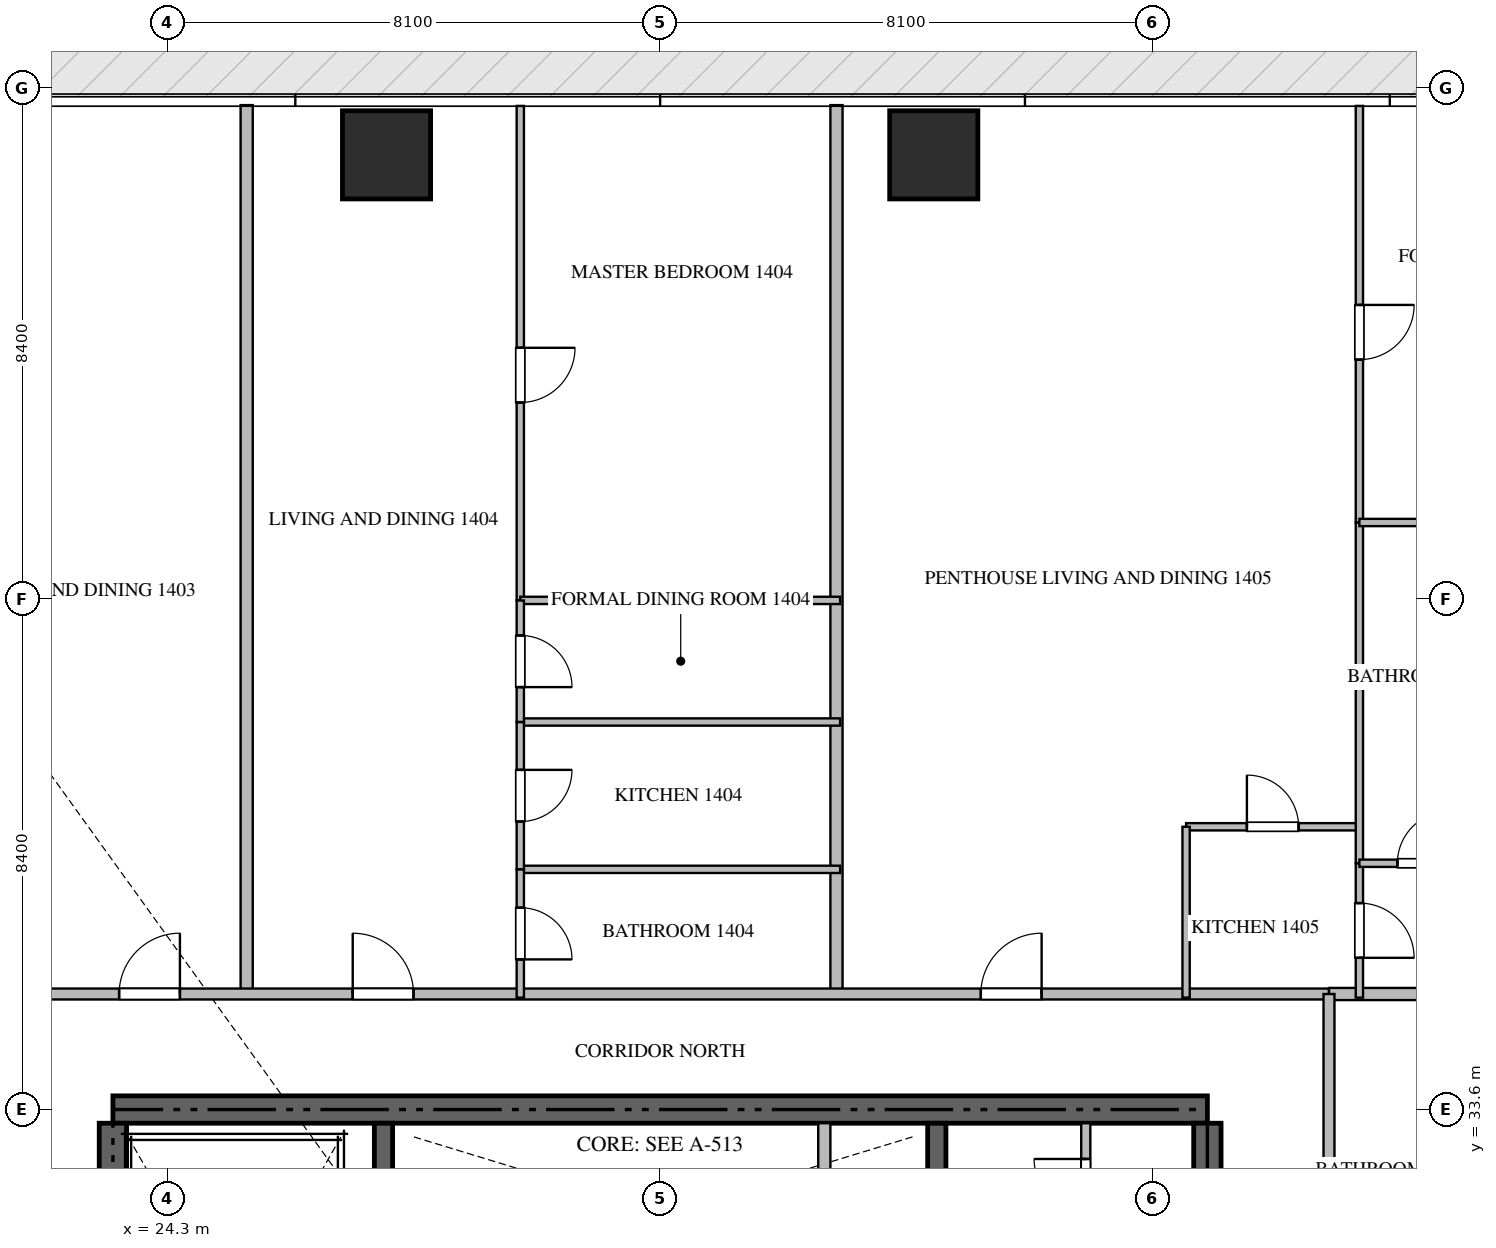
"""IFC4 building model, lengths in metres.
Left out: names, types, materials, properties, quantities, classifications, styles, units other than length and angle.
Written with IfcOpenShell. Run it as: python <this file> out.ifc"""

import sys

from ifc_helpers import new_model, si_unit, direction, frame, frame_2d, origin, origin_2d, place, context, subcontext, project, spatial, rectangle, extrude, source, transform, mapped, element, fill, save


model = new_model("IFC4")
c1 = context("Model", 3, precision=1e-05, world=origin(), true_north=direction((0.0, 1.0)))
c2 = subcontext(c1, "Body", "Model", "MODEL_VIEW")
j1 = project(units=[si_unit("LENGTHUNIT", "METRE"), si_unit("PLANEANGLEUNIT", "RADIAN")], contexts=[c1])
p1 = place(None, origin())
s1 = spatial("IfcSite", under=j1, at=p1, CompositionType="ELEMENT")
p2 = place(p1, origin())
s2 = spatial("IfcBuilding", under=s1, at=p2, CompositionType="ELEMENT")
p3 = place(p2, frame((0.0, 0.0, 60.45)))
s3 = spatial("IfcBuildingStorey", under=s2, at=p3, CompositionType="ELEMENT", Elevation=60.45)
p4 = place(p3, frame((41.4, 33.6, -0.26), z_axis=(0.0, 0.0, 1.0), x_axis=(-1.0, 0.0, 0.0)))
e1 = element("IfcWall", 1, at=p4, inside=s3, PredefinedType="SHEAR", context=c2, shape_type="SweptSolid", body=[
    extrude(rectangle(XDim=18.0, YDim=0.45, at=frame_2d((9.0, 0.0))), origin(), (0.0, 0.0, 1.0), 3.748),
])
p5 = place(p3, frame((23.4, 24.25, -0.26), z_axis=(0.0, 0.0, 1.0), x_axis=(0.0, 1.0, 0.0)))
e2 = element("IfcWall", 2, at=p5, inside=s3, PredefinedType="SHEAR", context=c2, shape_type="SweptSolid", body=[
    extrude(rectangle(XDim=9.125, YDim=0.45, at=frame_2d((4.562, 0.0))), origin(), (0.0, 0.0, 1.0), 3.748),
])
p6 = place(p3, frame((41.4, 27.75, -0.26), z_axis=(0.0, 0.0, 1.0), x_axis=(0.0, 1.0, 0.0)))
e3 = element("IfcWall", 3, at=p6, inside=s3, PredefinedType="SHEAR", context=c2, shape_type="SweptSolid", body=[
    extrude(rectangle(XDim=5.625, YDim=0.45, at=frame_2d((2.812, 0.0))), origin(), (0.0, 0.0, 1.0), 3.748),
])
p7 = place(p3, frame((27.85, 23.55, -0.26), z_axis=(0.0, 0.0, 1.0), x_axis=(0.0, 1.0, 0.0)))
e4 = element("IfcWall", 4, at=p7, inside=s3, PredefinedType="SHEAR", context=c2, shape_type="SweptSolid", body=[
    extrude(rectangle(XDim=9.825, YDim=0.3, at=frame_2d((4.913, 0.0))), origin(), (0.0, 0.0, 1.0), 3.748),
])
p8 = place(p3, frame((36.95, 27.05, -0.26), z_axis=(0.0, 0.0, 1.0), x_axis=(0.0, 1.0, 0.0)))
e5 = element("IfcWall", 5, at=p8, inside=s3, PredefinedType="SHEAR", context=c2, shape_type="SweptSolid", body=[
    extrude(rectangle(XDim=6.325, YDim=0.3, at=frame_2d((3.163, 0.0))), origin(), (0.0, 0.0, 1.0), 3.748),
])
m1 = source(origin(), c2, "Body", "SweptSolid", [
    extrude(rectangle(XDim=1.45, YDim=1.45, at=origin_2d()), origin(), (0.0, 0.0, 1.0), 3.75),
])
for number, where, z_axis, x_axis in (
    (6, (27.9, 49.3, -0.26), (0.0, 0.0, 1.0), (1.0, 0.0, 0.0)),
    (7, (36.9, 49.3, -0.26), (0.0, 0.0, 1.0), (1.0, 0.0, 0.0)),
):
    element("IfcColumn", number, at=place(p3, frame(where, z_axis=z_axis, x_axis=x_axis)), inside=s3, PredefinedType="COLUMN", context=c2, shape_type="MappedRepresentation", body=[
        mapped(m1, transform((0.0, 0.0, 0.0), scale=1.0)),
    ])
p9 = place(p3, frame((35.1, 30.75, 0.0), z_axis=(0.0, 0.0, 1.0), x_axis=(0.0, 1.0, 0.0)))
e8 = element("IfcWall", 8, at=p9, inside=s3, PredefinedType="STANDARD", context=c2, shape_type="SweptSolid", body=[
    extrude(rectangle(XDim=2.625, YDim=0.2, at=frame_2d((1.312, 0.0))), origin(), (0.0, 0.0, 1.0), 3.49),
])
p10 = place(p3, frame((39.4, 31.35, 0.0), z_axis=(0.0, 0.0, 1.0), x_axis=(0.0, 1.0, 0.0)))
e9 = element("IfcWall", 9, at=p10, inside=s3, PredefinedType="PARTITIONING", context=c2, shape_type="SweptSolid", body=[
    extrude(rectangle(XDim=2.025, YDim=0.15, at=frame_2d((1.012, 0.0))), origin(), (0.0, 0.0, 1.0), 3.49),
])
p11 = place(p10, frame((0.587, 0.0, 0.0)))
e10 = element("IfcOpeningElement", 10, at=p11, cuts=e9, PredefinedType="OPENING", context=c2, shape_type="SweptSolid", body=[
    extrude(rectangle(XDim=0.85, YDim=2.1, at=frame_2d((0.425, 1.05))), frame((0.0, 0.085, 0.0), z_axis=(0.0, -1.0, 0.0), x_axis=(1.0, 0.0, 0.0)), (0.0, 0.0, 1.0), 0.17),
])
for number, where, z_axis, x_axis in (
    (11, (25.6, 35.5, 0.0), (0.0, 0.0, 1.0), (0.0, 1.0, 0.0)),
    (12, (35.3, 35.5, 0.0), (0.0, 0.0, 1.0), (0.0, 1.0, 0.0)),
):
    element("IfcWall", number, at=place(p3, frame(where, z_axis=z_axis, x_axis=x_axis)), inside=s3, PredefinedType="PARTITIONING", context=c2, shape_type="SweptSolid", body=[
        extrude(rectangle(XDim=14.618, YDim=0.2, at=frame_2d((7.309, 0.0))), origin(), (0.0, 0.0, 1.0), 3.49),
    ])
p12 = place(p3, frame((43.4, 35.5, 0.0), z_axis=(0.0, 0.0, 1.0), x_axis=(1.0, 0.0, 0.0)))
e13 = element("IfcWall", 13, at=p12, inside=s3, PredefinedType="PARTITIONING", context=c2, shape_type="SweptSolid", body=[
    extrude(rectangle(XDim=15.318, YDim=0.2, at=frame_2d((7.659, 0.0))), origin(), (0.0, 0.0, 1.0), 3.49),
])
p13 = place(p3, frame((21.402, 35.5, 0.0), z_axis=(0.0, 0.0, 1.0), x_axis=(1.0, 0.0, 0.0)))
e14 = element("IfcWall", 14, at=p13, inside=s3, PredefinedType="PARTITIONING", context=c2, shape_type="SweptSolid", body=[
    extrude(rectangle(XDim=21.996, YDim=0.18, at=frame_2d((10.998, 0.0))), origin(), (0.0, 0.0, 1.0), 3.49),
])
p14 = place(p13, frame((2.1, 0.0, 0.0)))
e15 = element("IfcOpeningElement", 15, at=p14, cuts=e14, PredefinedType="OPENING", context=c2, shape_type="SweptSolid", body=[
    extrude(rectangle(XDim=1.0, YDim=2.15, at=frame_2d((0.5, 1.075))), frame((0.0, 0.1, 0.0), z_axis=(0.0, -1.0, 0.0), x_axis=(1.0, 0.0, 0.0)), (0.0, 0.0, 1.0), 0.2),
])
p15 = place(p13, frame((5.942, 0.0, 0.0)))
e16 = element("IfcOpeningElement", 16, at=p15, cuts=e14, PredefinedType="OPENING", context=c2, shape_type="SweptSolid", body=[
    extrude(rectangle(XDim=1.0, YDim=2.15, at=frame_2d((0.5, 1.075))), frame((0.0, 0.1, 0.0), z_axis=(0.0, -1.0, 0.0), x_axis=(1.0, 0.0, 0.0)), (0.0, 0.0, 1.0), 0.2),
])
p16 = place(p13, frame((16.272, 0.0, 0.0)))
e17 = element("IfcOpeningElement", 17, at=p16, cuts=e14, PredefinedType="OPENING", context=c2, shape_type="SweptSolid", body=[
    extrude(rectangle(XDim=1.0, YDim=2.15, at=frame_2d((0.5, 1.075))), frame((0.0, 0.1, 0.0), z_axis=(0.0, -1.0, 0.0), x_axis=(1.0, 0.0, 0.0)), (0.0, 0.0, 1.0), 0.2),
])
p17 = place(p3, frame((43.4, 14.9, 0.0), z_axis=(0.0, 0.0, 1.0), x_axis=(0.0, 1.0, 0.0)))
e18 = element("IfcWall", 18, at=p17, inside=s3, PredefinedType="PARTITIONING", context=c2, shape_type="SweptSolid", body=[
    extrude(rectangle(XDim=20.6, YDim=0.18, at=frame_2d((10.3, 0.0))), origin(), (0.0, 0.0, 1.0), 3.49),
])
p18 = place(p17, frame((5.429, 0.0, 0.0)))
e19 = element("IfcOpeningElement", 19, at=p18, cuts=e18, PredefinedType="OPENING", context=c2, shape_type="SweptSolid", body=[
    extrude(rectangle(XDim=1.0, YDim=2.15, at=frame_2d((0.5, 1.075))), frame((0.0, 0.1, 0.0), z_axis=(0.0, -1.0, 0.0), x_axis=(1.0, 0.0, 0.0)), (0.0, 0.0, 1.0), 0.2),
])
p19 = place(p17, frame((10.506, 0.0, 0.0)))
e20 = element("IfcOpeningElement", 20, at=p19, cuts=e18, PredefinedType="OPENING", context=c2, shape_type="SweptSolid", body=[
    extrude(rectangle(XDim=1.0, YDim=2.15, at=frame_2d((0.5, 1.075))), frame((0.0, 0.1, 0.0), z_axis=(0.0, -1.0, 0.0), x_axis=(1.0, 0.0, 0.0)), (0.0, 0.0, 1.0), 0.2),
])
p20 = place(p3, frame((30.1, 50.105, 0.0), z_axis=(0.0, 0.0, 1.0), x_axis=(0.0, -1.0, 0.0)))
e21 = element("IfcWall", 21, at=p20, inside=s3, PredefinedType="PARTITIONING", context=c2, shape_type="SweptSolid", body=[
    extrude(rectangle(XDim=8.132, YDim=0.12, at=frame_2d((4.066, 0.0))), origin(), (0.0, 0.0, 1.0), 3.49),
])
p21 = place(p20, frame((3.978, 0.0, 0.0)))
e22 = element("IfcOpeningElement", 22, at=p21, cuts=e21, PredefinedType="OPENING", context=c2, shape_type="SweptSolid", body=[
    extrude(rectangle(XDim=0.9, YDim=2.1, at=frame_2d((0.45, 1.05))), frame((0.0, 0.07, 0.0), z_axis=(0.0, -1.0, 0.0), x_axis=(1.0, 0.0, 0.0)), (0.0, 0.0, 1.0), 0.14),
])
for number, where, z_axis, x_axis in (
    (23, (30.1, 41.973, 0.0), (0.0, 0.0, 1.0), (1.0, 0.0, 0.0)),
    (24, (30.1, 39.973, 0.0), (0.0, 0.0, 1.0), (1.0, 0.0, 0.0)),
    (25, (30.1, 37.55, 0.0), (0.0, 0.0, 1.0), (1.0, 0.0, 0.0)),
):
    element("IfcWall", number, at=place(p3, frame(where, z_axis=z_axis, x_axis=x_axis)), inside=s3, PredefinedType="PARTITIONING", context=c2, shape_type="SweptSolid", body=[
        extrude(rectangle(XDim=5.26, YDim=0.12, at=frame_2d((2.63, 0.0))), origin(), (0.0, 0.0, 1.0), 3.49),
    ])
p22 = place(p3, frame((30.1, 41.971, 0.0), z_axis=(0.0, 0.0, 1.0), x_axis=(0.0, -1.0, 0.0)))
e26 = element("IfcWall", 26, at=p22, inside=s3, PredefinedType="PARTITIONING", context=c2, shape_type="SweptSolid", body=[
    extrude(rectangle(XDim=1.998, YDim=0.12, at=frame_2d((0.999, 0.0))), origin(), (0.0, 0.0, 1.0), 3.49),
])
p23 = place(p22, frame((0.574, 0.0, 0.0)))
e27 = element("IfcOpeningElement", 27, at=p23, cuts=e26, PredefinedType="OPENING", context=c2, shape_type="SweptSolid", body=[
    extrude(rectangle(XDim=0.85, YDim=2.1, at=frame_2d((0.425, 1.05))), frame((0.0, 0.07, 0.0), z_axis=(0.0, -1.0, 0.0), x_axis=(1.0, 0.0, 0.0)), (0.0, 0.0, 1.0), 0.14),
])
p24 = place(p3, frame((30.1, 39.971, 0.0), z_axis=(0.0, 0.0, 1.0), x_axis=(0.0, -1.0, 0.0)))
e28 = element("IfcWall", 28, at=p24, inside=s3, PredefinedType="PARTITIONING", context=c2, shape_type="SweptSolid", body=[
    extrude(rectangle(XDim=2.421, YDim=0.12, at=frame_2d((1.21, 0.0))), origin(), (0.0, 0.0, 1.0), 3.49),
])
p25 = place(p24, frame((0.785, 0.0, 0.0)))
e29 = element("IfcOpeningElement", 29, at=p25, cuts=e28, PredefinedType="OPENING", context=c2, shape_type="SweptSolid", body=[
    extrude(rectangle(XDim=0.85, YDim=2.1, at=frame_2d((0.425, 1.05))), frame((0.0, 0.07, 0.0), z_axis=(0.0, -1.0, 0.0), x_axis=(1.0, 0.0, 0.0)), (0.0, 0.0, 1.0), 0.14),
])
p26 = place(p3, frame((30.1, 37.548, 0.0), z_axis=(0.0, 0.0, 1.0), x_axis=(0.0, -1.0, 0.0)))
e30 = element("IfcWall", 30, at=p26, inside=s3, PredefinedType="PARTITIONING", context=c2, shape_type="SweptSolid", body=[
    extrude(rectangle(XDim=2.108, YDim=0.12, at=frame_2d((1.054, 0.0))), origin(), (0.0, 0.0, 1.0), 3.49),
])
p27 = place(p26, frame((0.629, 0.0, 0.0)))
e31 = element("IfcOpeningElement", 31, at=p27, cuts=e30, PredefinedType="OPENING", context=c2, shape_type="SweptSolid", body=[
    extrude(rectangle(XDim=0.85, YDim=2.1, at=frame_2d((0.425, 1.05))), frame((0.0, 0.07, 0.0), z_axis=(0.0, -1.0, 0.0), x_axis=(1.0, 0.0, 0.0)), (0.0, 0.0, 1.0), 0.14),
])
p28 = place(p3, frame((41.05, 38.25, 0.0), z_axis=(0.0, 0.0, 1.0), x_axis=(1.0, 0.0, 0.0)))
e32 = element("IfcWall", 32, at=p28, inside=s3, PredefinedType="PARTITIONING", context=c2, shape_type="SweptSolid", body=[
    extrude(rectangle(XDim=2.85, YDim=0.12, at=frame_2d((1.425, 0.0))), origin(), (0.0, 0.0, 1.0), 3.49),
])
p29 = place(p28, frame((1.0, 0.0, 0.0)))
e33 = element("IfcOpeningElement", 33, at=p29, cuts=e32, PredefinedType="OPENING", context=c2, shape_type="SweptSolid", body=[
    extrude(rectangle(XDim=0.85, YDim=2.1, at=frame_2d((0.425, 1.05))), frame((0.0, 0.07, 0.0), z_axis=(0.0, -1.0, 0.0), x_axis=(1.0, 0.0, 0.0)), (0.0, 0.0, 1.0), 0.14),
])
p30 = place(p3, frame((41.05, 38.25, 0.0), z_axis=(0.0, 0.0, 1.0), x_axis=(0.0, -1.0, 0.0)))
e34 = element("IfcWall", 34, at=p30, inside=s3, PredefinedType="PARTITIONING", context=c2, shape_type="SweptSolid", body=[
    extrude(rectangle(XDim=2.81, YDim=0.12, at=frame_2d((1.405, 0.0))), origin(), (0.0, 0.0, 1.0), 3.49),
])
p31 = place(p3, frame((43.9, 37.65, 0.0), z_axis=(0.0, 0.0, 1.0), x_axis=(0.0, -1.0, 0.0)))
e35 = element("IfcWall", 35, at=p31, inside=s3, PredefinedType="PARTITIONING", context=c2, shape_type="SweptSolid", body=[
    extrude(rectangle(XDim=2.21, YDim=0.12, at=frame_2d((1.105, 0.0))), origin(), (0.0, 0.0, 1.0), 3.49),
])
p32 = place(p31, frame((0.655, 0.0, 0.0)))
e36 = element("IfcOpeningElement", 36, at=p32, cuts=e35, PredefinedType="OPENING", context=c2, shape_type="SweptSolid", body=[
    extrude(rectangle(XDim=0.9, YDim=2.1, at=frame_2d((0.45, 1.05))), frame((0.0, 0.07, 0.0), z_axis=(0.0, -1.0, 0.0), x_axis=(1.0, 0.0, 0.0)), (0.0, 0.0, 1.0), 0.14),
])
p33 = place(p3, frame((43.9, 50.105, 0.0), z_axis=(0.0, 0.0, 1.0), x_axis=(0.0, -1.0, 0.0)))
e37 = element("IfcWall", 37, at=p33, inside=s3, PredefinedType="PARTITIONING", context=c2, shape_type="SweptSolid", body=[
    extrude(rectangle(XDim=6.851, YDim=0.12, at=frame_2d((3.426, 0.0))), origin(), (0.0, 0.0, 1.0), 3.49),
])
p34 = place(p33, frame((3.273, 0.0, 0.0)))
e38 = element("IfcOpeningElement", 38, at=p34, cuts=e37, PredefinedType="OPENING", context=c2, shape_type="SweptSolid", body=[
    extrude(rectangle(XDim=0.9, YDim=2.1, at=frame_2d((0.45, 1.05))), frame((0.0, 0.07, 0.0), z_axis=(0.0, -1.0, 0.0), x_axis=(1.0, 0.0, 0.0)), (0.0, 0.0, 1.0), 0.14),
])
p35 = place(p3, frame((43.9, 43.252, 0.0), z_axis=(0.0, 0.0, 1.0), x_axis=(0.0, -1.0, 0.0)))
e39 = element("IfcWall", 39, at=p35, inside=s3, PredefinedType="PARTITIONING", context=c2, shape_type="SweptSolid", body=[
    extrude(rectangle(XDim=5.6, YDim=0.12, at=frame_2d((2.8, 0.0))), origin(), (0.0, 0.0, 1.0), 3.49),
])
p36 = place(p3, frame((43.9, 43.254, 0.0), z_axis=(0.0, 0.0, 1.0), x_axis=(1.0, 0.0, 0.0)))
e40 = element("IfcWall", 40, at=p36, inside=s3, PredefinedType="PARTITIONING", context=c2, shape_type="SweptSolid", body=[
    extrude(rectangle(XDim=5.15, YDim=0.12, at=frame_2d((2.575, 0.0))), origin(), (0.0, 0.0, 1.0), 3.49),
])
p37 = place(p3, frame((43.9, 37.65, 0.0), z_axis=(0.0, 0.0, 1.0), x_axis=(1.0, 0.0, 0.0)))
e41 = element("IfcWall", 41, at=p37, inside=s3, PredefinedType="PARTITIONING", context=c2, shape_type="SweptSolid", body=[
    extrude(rectangle(XDim=2.1, YDim=0.12, at=frame_2d((1.05, 0.0))), origin(), (0.0, 0.0, 1.0), 3.49),
])
p38 = place(p37, frame((0.625, 0.0, 0.0)))
e42 = element("IfcOpeningElement", 42, at=p38, cuts=e41, PredefinedType="OPENING", context=c2, shape_type="SweptSolid", body=[
    extrude(rectangle(XDim=0.85, YDim=2.1, at=frame_2d((0.425, 1.05))), frame((0.0, 0.07, 0.0), z_axis=(0.0, -1.0, 0.0), x_axis=(1.0, 0.0, 0.0)), (0.0, 0.0, 1.0), 0.14),
])
m2 = source(origin(), c2, "Body", "SweptSolid", [
    extrude(rectangle(XDim=0.85, YDim=2.1, at=frame_2d((0.425, 1.05))), frame((0.0, 0.025, 0.0), z_axis=(0.0, -1.0, 0.0), x_axis=(1.0, 0.0, 0.0)), (0.0, 0.0, 1.0), 0.05),
])
p39 = place(p11, origin())
e43 = element("IfcDoor", 43, at=p39, inside=s3, OperationType="SINGLE_SWING_RIGHT", PredefinedType="DOOR", context=c2, shape_type="MappedRepresentation", body=[
    mapped(m2, transform((0.0, 0.0, 0.0), scale=1.0)),
])
fill(e10, e43)
m3 = source(origin(), c2, "Body", "SweptSolid", [
    extrude(rectangle(XDim=1.0, YDim=2.15, at=frame_2d((0.5, 1.075))), frame((0.0, 0.025, 0.0), z_axis=(0.0, -1.0, 0.0), x_axis=(1.0, 0.0, 0.0)), (0.0, 0.0, 1.0), 0.05),
])
p40 = place(p14, origin())
e44 = element("IfcDoor", 44, at=p40, inside=s3, OperationType="SINGLE_SWING_RIGHT", PredefinedType="DOOR", context=c2, shape_type="MappedRepresentation", body=[
    mapped(m3, transform((0.0, 0.0, 0.0), scale=1.0)),
])
fill(e15, e44)
p41 = place(p15, origin())
e45 = element("IfcDoor", 45, at=p41, inside=s3, OperationType="SINGLE_SWING_LEFT", PredefinedType="DOOR", context=c2, shape_type="MappedRepresentation", body=[
    mapped(m3, transform((0.0, 0.0, 0.0), scale=1.0)),
])
fill(e16, e45)
p42 = place(p16, origin())
e46 = element("IfcDoor", 46, at=p42, inside=s3, OperationType="SINGLE_SWING_RIGHT", PredefinedType="DOOR", context=c2, shape_type="MappedRepresentation", body=[
    mapped(m3, transform((0.0, 0.0, 0.0), scale=1.0)),
])
fill(e17, e46)
m4 = source(origin(), c2, "Body", "SweptSolid", [
    extrude(rectangle(XDim=0.9, YDim=2.1, at=frame_2d((0.45, 1.05))), frame((0.0, 0.025, 0.0), z_axis=(0.0, -1.0, 0.0), x_axis=(1.0, 0.0, 0.0)), (0.0, 0.0, 1.0), 0.05),
])
p43 = place(p21, origin())
e47 = element("IfcDoor", 47, at=p43, inside=s3, OperationType="SINGLE_SWING_LEFT", PredefinedType="DOOR", context=c2, shape_type="MappedRepresentation", body=[
    mapped(m4, transform((0.0, 0.0, 0.0), scale=1.0)),
])
fill(e22, e47)
p44 = place(p23, origin())
e48 = element("IfcDoor", 48, at=p44, inside=s3, OperationType="SINGLE_SWING_RIGHT", PredefinedType="DOOR", context=c2, shape_type="MappedRepresentation", body=[
    mapped(m2, transform((0.0, 0.0, 0.0), scale=1.0)),
])
fill(e27, e48)
p45 = place(p25, origin())
e49 = element("IfcDoor", 49, at=p45, inside=s3, OperationType="SINGLE_SWING_LEFT", PredefinedType="DOOR", context=c2, shape_type="MappedRepresentation", body=[
    mapped(m2, transform((0.0, 0.0, 0.0), scale=1.0)),
])
fill(e29, e49)
p46 = place(p27, origin())
e50 = element("IfcDoor", 50, at=p46, inside=s3, OperationType="SINGLE_SWING_RIGHT", PredefinedType="DOOR", context=c2, shape_type="MappedRepresentation", body=[
    mapped(m2, transform((0.0, 0.0, 0.0), scale=1.0)),
])
fill(e31, e50)
p47 = place(p29, origin())
e51 = element("IfcDoor", 51, at=p47, inside=s3, OperationType="SINGLE_SWING_LEFT", PredefinedType="DOOR", context=c2, shape_type="MappedRepresentation", body=[
    mapped(m2, transform((0.0, 0.0, 0.0), scale=1.0)),
])
fill(e33, e51)
p48 = place(p32, origin())
e52 = element("IfcDoor", 52, at=p48, inside=s3, OperationType="SINGLE_SWING_RIGHT", PredefinedType="DOOR", context=c2, shape_type="MappedRepresentation", body=[
    mapped(m4, transform((0.0, 0.0, 0.0), scale=1.0)),
])
fill(e36, e52)
p49 = place(p34, origin())
e53 = element("IfcDoor", 53, at=p49, inside=s3, OperationType="SINGLE_SWING_LEFT", PredefinedType="DOOR", context=c2, shape_type="MappedRepresentation", body=[
    mapped(m4, transform((0.0, 0.0, 0.0), scale=1.0)),
])
fill(e38, e53)
p50 = place(p38, origin())
e54 = element("IfcDoor", 54, at=p50, inside=s3, OperationType="SINGLE_SWING_RIGHT", PredefinedType="DOOR", context=c2, shape_type="MappedRepresentation", body=[
    mapped(m2, transform((0.0, 0.0, 0.0), scale=1.0)),
])
fill(e42, e54)
save(model, sys.argv[1])
